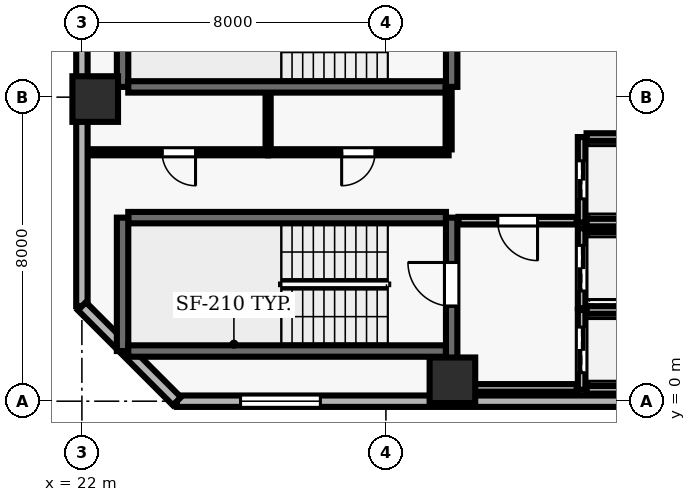
"""IFC4 building model, lengths in metres.
Left out: names, types, materials, properties, quantities, classifications, styles, units other than length and angle.
Written with IfcOpenShell. Run it as: python <this file> out.ifc"""

import sys

from ifc_helpers import new_model, si_unit, direction, frame, frame_2d, origin, origin_2d, place, context, subcontext, project, spatial, rectangle, extrude, element, fill, save


model = new_model("IFC4")
c1 = context("Model", 3, precision=1e-05, world=origin(), true_north=direction((0.0, 1.0)))
c2 = subcontext(c1, "Body", "Model", "MODEL_VIEW")
j1 = project(units=[si_unit("LENGTHUNIT", "METRE"), si_unit("PLANEANGLEUNIT", "RADIAN")], contexts=[c1])
p1 = place(None, origin())
s1 = spatial("IfcSite", under=j1, at=p1, CompositionType="ELEMENT")
p2 = place(p1, origin())
s2 = spatial("IfcBuilding", under=s1, at=p2, CompositionType="ELEMENT")
p3 = place(p2, frame((0.0, 0.0, 161.9)))
s3 = spatial("IfcBuildingStorey", under=s2, at=p3, CompositionType="ELEMENT", Elevation=161.9)
for number, where, z_axis, x_axis in (
    (1, (31.75, 0.55, 0.0), (0.0, 0.0, 1.0), (1.0, 0.0, 0.0)),
    (2, (22.35, 7.95, 0.0), (0.0, 0.0, 1.0), (1.0, 0.0, 0.0)),
):
    element("IfcColumn", number, at=place(p3, frame(where, z_axis=z_axis, x_axis=x_axis)), inside=s3, PredefinedType="COLUMN", context=c2, shape_type="SweptSolid", body=[
        extrude(rectangle(XDim=1.2, YDim=1.2, at=origin_2d()), origin(), (0.0, 0.0, 1.0), 3.9),
    ])
p4 = place(p3, frame((24.5, 0.0, 0.0), z_axis=(0.0, 0.0, 1.0), x_axis=(1.0, 0.0, 0.0)))
e3 = element("IfcWall", 3, at=p4, inside=s3, PredefinedType="SOLIDWALL", context=c2, shape_type="SweptSolid", body=[
    extrude(rectangle(XDim=43.6, YDim=0.3, at=frame_2d((21.8, 0.0))), origin(), (0.0, 0.0, 1.0), 3.64),
])
p5 = place(p4, frame((1.675, 0.0, 0.9)))
e4 = element("IfcOpeningElement", 4, at=p5, cuts=e3, PredefinedType="OPENING", context=c2, shape_type="SweptSolid", body=[
    extrude(rectangle(XDim=2.1, YDim=1.6, at=frame_2d((1.05, 0.8))), frame((0.0, 0.16, 0.0), z_axis=(0.0, -1.0, 0.0), x_axis=(1.0, 0.0, 0.0)), (0.0, 0.0, 1.0), 0.32),
])
p6 = place(p4, frame((18.025, 0.0, 0.9)))
e5 = element("IfcOpeningElement", 5, at=p6, cuts=e3, PredefinedType="OPENING", context=c2, shape_type="SweptSolid", body=[
    extrude(rectangle(XDim=2.1, YDim=1.6, at=frame_2d((1.05, 0.8))), frame((0.0, 0.16, 0.0), z_axis=(0.0, -1.0, 0.0), x_axis=(1.0, 0.0, 0.0)), (0.0, 0.0, 1.0), 0.32),
])
p7 = place(p4, frame((24.375, 0.0, 0.9)))
e6 = element("IfcOpeningElement", 6, at=p7, cuts=e3, PredefinedType="OPENING", context=c2, shape_type="SweptSolid", body=[
    extrude(rectangle(XDim=2.1, YDim=1.6, at=frame_2d((1.05, 0.8))), frame((0.0, 0.16, 0.0), z_axis=(0.0, -1.0, 0.0), x_axis=(1.0, 0.0, 0.0)), (0.0, 0.0, 1.0), 0.32),
])
p8 = place(p4, frame((28.925, 0.0, 0.9)))
e7 = element("IfcOpeningElement", 7, at=p8, cuts=e3, PredefinedType="OPENING", context=c2, shape_type="SweptSolid", body=[
    extrude(rectangle(XDim=2.1, YDim=1.6, at=frame_2d((1.05, 0.8))), frame((0.0, 0.16, 0.0), z_axis=(0.0, -1.0, 0.0), x_axis=(1.0, 0.0, 0.0)), (0.0, 0.0, 1.0), 0.32),
])
p9 = place(p4, frame((34.375, 0.0, 0.9)))
e8 = element("IfcOpeningElement", 8, at=p9, cuts=e3, PredefinedType="OPENING", context=c2, shape_type="SweptSolid", body=[
    extrude(rectangle(XDim=2.1, YDim=1.6, at=frame_2d((1.05, 0.8))), frame((0.0, 0.16, 0.0), z_axis=(0.0, -1.0, 0.0), x_axis=(1.0, 0.0, 0.0)), (0.0, 0.0, 1.0), 0.32),
])
p10 = place(p4, frame((39.825, 0.0, 0.9)))
e9 = element("IfcOpeningElement", 9, at=p10, cuts=e3, PredefinedType="OPENING", context=c2, shape_type="SweptSolid", body=[
    extrude(rectangle(XDim=2.1, YDim=1.6, at=frame_2d((1.05, 0.8))), frame((0.0, 0.16, 0.0), z_axis=(0.0, -1.0, 0.0), x_axis=(1.0, 0.0, 0.0)), (0.0, 0.0, 1.0), 0.32),
])
p11 = place(p3, frame((22.0, 46.1, 0.0), z_axis=(0.0, 0.0, 1.0), x_axis=(0.0, -1.0, 0.0)))
e10 = element("IfcWall", 10, at=p11, inside=s3, PredefinedType="SOLIDWALL", context=c2, shape_type="SweptSolid", body=[
    extrude(rectangle(XDim=43.6, YDim=0.3, at=frame_2d((21.8, 0.0))), origin(), (0.0, 0.0, 1.0), 3.64),
])
p12 = place(p11, frame((7.1, 0.0, 0.0)))
e11 = element("IfcOpeningElement", 11, at=p12, cuts=e10, PredefinedType="OPENING", context=c2, shape_type="SweptSolid", body=[
    extrude(rectangle(XDim=1.0, YDim=2.2, at=frame_2d((0.5, 1.1))), frame((0.0, 0.16, 0.0), z_axis=(0.0, -1.0, 0.0), x_axis=(1.0, 0.0, 0.0)), (0.0, 0.0, 1.0), 0.32),
])
p13 = place(p11, frame((1.675, 0.0, 0.9)))
e12 = element("IfcOpeningElement", 12, at=p13, cuts=e10, PredefinedType="OPENING", context=c2, shape_type="SweptSolid", body=[
    extrude(rectangle(XDim=2.1, YDim=1.6, at=frame_2d((1.05, 0.8))), frame((0.0, 0.16, 0.0), z_axis=(0.0, -1.0, 0.0), x_axis=(1.0, 0.0, 0.0)), (0.0, 0.0, 1.0), 0.32),
])
p14 = place(p11, frame((13.475, 0.0, 0.9)))
e13 = element("IfcOpeningElement", 13, at=p14, cuts=e10, PredefinedType="OPENING", context=c2, shape_type="SweptSolid", body=[
    extrude(rectangle(XDim=2.1, YDim=1.6, at=frame_2d((1.05, 0.8))), frame((0.0, 0.16, 0.0), z_axis=(0.0, -1.0, 0.0), x_axis=(1.0, 0.0, 0.0)), (0.0, 0.0, 1.0), 0.32),
])
p15 = place(p11, frame((17.125, 0.0, 0.9)))
e14 = element("IfcOpeningElement", 14, at=p15, cuts=e10, PredefinedType="OPENING", context=c2, shape_type="SweptSolid", body=[
    extrude(rectangle(XDim=2.1, YDim=1.6, at=frame_2d((1.05, 0.8))), frame((0.0, 0.16, 0.0), z_axis=(0.0, -1.0, 0.0), x_axis=(1.0, 0.0, 0.0)), (0.0, 0.0, 1.0), 0.32),
])
p16 = place(p11, frame((23.475, 0.0, 0.9)))
e15 = element("IfcOpeningElement", 15, at=p16, cuts=e10, PredefinedType="OPENING", context=c2, shape_type="SweptSolid", body=[
    extrude(rectangle(XDim=2.1, YDim=1.6, at=frame_2d((1.05, 0.8))), frame((0.0, 0.16, 0.0), z_axis=(0.0, -1.0, 0.0), x_axis=(1.0, 0.0, 0.0)), (0.0, 0.0, 1.0), 0.32),
])
p17 = place(p11, frame((28.475, 0.0, 0.9)))
e16 = element("IfcOpeningElement", 16, at=p17, cuts=e10, PredefinedType="OPENING", context=c2, shape_type="SweptSolid", body=[
    extrude(rectangle(XDim=2.1, YDim=1.6, at=frame_2d((1.05, 0.8))), frame((0.0, 0.16, 0.0), z_axis=(0.0, -1.0, 0.0), x_axis=(1.0, 0.0, 0.0)), (0.0, 0.0, 1.0), 0.32),
])
p18 = place(p11, frame((34.375, 0.0, 0.9)))
e17 = element("IfcOpeningElement", 17, at=p18, cuts=e10, PredefinedType="OPENING", context=c2, shape_type="SweptSolid", body=[
    extrude(rectangle(XDim=2.1, YDim=1.6, at=frame_2d((1.05, 0.8))), frame((0.0, 0.16, 0.0), z_axis=(0.0, -1.0, 0.0), x_axis=(1.0, 0.0, 0.0)), (0.0, 0.0, 1.0), 0.32),
])
p19 = place(p3, frame((22.0, 2.5, 0.0), z_axis=(0.0, 0.0, 1.0), x_axis=(0.707106781187, -0.707106781187, 0.0)))
e18 = element("IfcWall", 18, at=p19, inside=s3, PredefinedType="SOLIDWALL", context=c2, shape_type="SweptSolid", body=[
    extrude(rectangle(XDim=3.536, YDim=0.3, at=frame_2d((1.768, 0.0))), origin(), (0.0, 0.0, 1.0), 3.64),
])
p20 = place(p3, frame((31.58, 4.83, 0.0), z_axis=(0.0, 0.0, 1.0), x_axis=(-1.0, 0.0, 0.0)))
e19 = element("IfcWall", 19, at=p20, inside=s3, PredefinedType="SHEAR", context=c2, shape_type="SweptSolid", body=[
    extrude(rectangle(XDim=8.36, YDim=0.3, at=frame_2d((4.18, 0.0))), origin(), (0.0, 0.0, 1.0), 3.64),
])
p21 = place(p3, frame((23.07, 4.83, 0.0), z_axis=(0.0, 0.0, 1.0), x_axis=(0.0, -1.0, 0.0)))
e20 = element("IfcWall", 20, at=p21, inside=s3, PredefinedType="SHEAR", context=c2, shape_type="SweptSolid", body=[
    extrude(rectangle(XDim=3.51, YDim=0.3, at=frame_2d((1.755, 0.0))), origin(), (0.0, 0.0, 1.0), 3.64),
])
p22 = place(p3, frame((23.22, 1.32, 0.0), z_axis=(0.0, 0.0, 1.0), x_axis=(1.0, 0.0, 0.0)))
e21 = element("IfcWall", 21, at=p22, inside=s3, PredefinedType="SHEAR", context=c2, shape_type="SweptSolid", body=[
    extrude(rectangle(XDim=8.36, YDim=0.3, at=frame_2d((4.18, 0.0))), origin(), (0.0, 0.0, 1.0), 3.64),
])
p23 = place(p3, frame((31.73, 0.96, 0.0), z_axis=(0.0, 0.0, 1.0), x_axis=(0.0, 1.0, 0.0)))
e22 = element("IfcWall", 22, at=p23, inside=s3, PredefinedType="SHEAR", context=c2, shape_type="SweptSolid", body=[
    extrude(rectangle(XDim=3.87, YDim=0.3, at=frame_2d((1.935, 0.0))), origin(), (0.0, 0.0, 1.0), 3.64),
])
p24 = place(p23, frame((1.54, 0.0, 0.0)))
e23 = element("IfcOpeningElement", 23, at=p24, cuts=e22, PredefinedType="OPENING", context=c2, shape_type="SweptSolid", body=[
    extrude(rectangle(XDim=1.15, YDim=2.15, at=frame_2d((0.575, 1.075))), frame((0.0, 0.16, 0.0), z_axis=(0.0, -1.0, 0.0), x_axis=(1.0, 0.0, 0.0)), (0.0, 0.0, 1.0), 0.32),
])
p25 = place(p3, frame((23.07, 11.78, 0.0), z_axis=(0.0, 0.0, 1.0), x_axis=(0.0, -1.0, 0.0)))
e24 = element("IfcWall", 24, at=p25, inside=s3, PredefinedType="SHEAR", context=c2, shape_type="SweptSolid", body=[
    extrude(rectangle(XDim=3.51, YDim=0.3, at=frame_2d((1.755, 0.0))), origin(), (0.0, 0.0, 1.0), 3.64),
])
p26 = place(p3, frame((23.22, 8.27, 0.0), z_axis=(0.0, 0.0, 1.0), x_axis=(1.0, 0.0, 0.0)))
e25 = element("IfcWall", 25, at=p26, inside=s3, PredefinedType="SHEAR", context=c2, shape_type="SweptSolid", body=[
    extrude(rectangle(XDim=8.36, YDim=0.3, at=frame_2d((4.18, 0.0))), origin(), (0.0, 0.0, 1.0), 3.64),
])
p27 = place(p3, frame((31.73, 8.27, 0.0), z_axis=(0.0, 0.0, 1.0), x_axis=(0.0, 1.0, 0.0)))
e26 = element("IfcWall", 26, at=p27, inside=s3, PredefinedType="SHEAR", context=c2, shape_type="SweptSolid", body=[
    extrude(rectangle(XDim=3.51, YDim=0.3, at=frame_2d((1.755, 0.0))), origin(), (0.0, 0.0, 1.0), 3.64),
])
p28 = place(p27, frame((1.18, 0.0, 0.0)))
e27 = element("IfcOpeningElement", 27, at=p28, cuts=e26, PredefinedType="OPENING", context=c2, shape_type="SweptSolid", body=[
    extrude(rectangle(XDim=1.15, YDim=2.15, at=frame_2d((0.575, 1.075))), frame((0.0, 0.16, 0.0), z_axis=(0.0, -1.0, 0.0), x_axis=(1.0, 0.0, 0.0)), (0.0, 0.0, 1.0), 0.32),
])
p29 = place(p3, frame((35.15, 2.4, 0.0), z_axis=(0.0, 0.0, 1.0), x_axis=(0.0, -1.0, 0.0)))
e28 = element("IfcWall", 28, at=p29, inside=s3, PredefinedType="SOLIDWALL", context=c2, shape_type="SweptSolid", body=[
    extrude(rectangle(XDim=2.1, YDim=0.2, at=frame_2d((1.05, 0.0))), origin(), (0.0, 0.0, 1.0), 3.64),
])
p30 = place(p29, frame((0.45, 0.0, 0.0)))
e29 = element("IfcOpeningElement", 29, at=p30, cuts=e28, PredefinedType="OPENING", context=c2, shape_type="SweptSolid", body=[
    extrude(rectangle(XDim=1.2, YDim=2.15, at=frame_2d((0.6, 1.075))), frame((0.0, 0.11, 0.0), z_axis=(0.0, -1.0, 0.0), x_axis=(1.0, 0.0, 0.0)), (0.0, 0.0, 1.0), 0.22),
])
for number, where, z_axis, x_axis in (
    (30, (35.28, 0.3, 0.0), (0.0, 0.0, 1.0), (1.0, 0.0, 0.0)),
    (31, (37.42, 2.4, 0.0), (0.0, 0.0, 1.0), (-1.0, 0.0, 0.0)),
):
    element("IfcWall", number, at=place(p3, frame(where, z_axis=z_axis, x_axis=x_axis)), inside=s3, PredefinedType="SOLIDWALL", context=c2, shape_type="SweptSolid", body=[
        extrude(rectangle(XDim=2.14, YDim=0.2, at=frame_2d((1.07, 0.0))), origin(), (0.0, 0.0, 1.0), 3.64),
    ])
p31 = place(p3, frame((35.15, 4.55, 0.0), z_axis=(0.0, 0.0, 1.0), x_axis=(0.0, -1.0, 0.0)))
e32 = element("IfcWall", 32, at=p31, inside=s3, PredefinedType="SOLIDWALL", context=c2, shape_type="SweptSolid", body=[
    extrude(rectangle(XDim=2.1, YDim=0.2, at=frame_2d((1.05, 0.0))), origin(), (0.0, 0.0, 1.0), 3.64),
])
p32 = place(p31, frame((0.45, 0.0, 0.0)))
e33 = element("IfcOpeningElement", 33, at=p32, cuts=e32, PredefinedType="OPENING", context=c2, shape_type="SweptSolid", body=[
    extrude(rectangle(XDim=1.2, YDim=2.15, at=frame_2d((0.6, 1.075))), frame((0.0, 0.11, 0.0), z_axis=(0.0, -1.0, 0.0), x_axis=(1.0, 0.0, 0.0)), (0.0, 0.0, 1.0), 0.22),
])
p33 = place(p3, frame((37.42, 4.55, 0.0), z_axis=(0.0, 0.0, 1.0), x_axis=(-1.0, 0.0, 0.0)))
e34 = element("IfcWall", 34, at=p33, inside=s3, PredefinedType="SOLIDWALL", context=c2, shape_type="SweptSolid", body=[
    extrude(rectangle(XDim=2.14, YDim=0.2, at=frame_2d((1.07, 0.0))), origin(), (0.0, 0.0, 1.0), 3.64),
])
p34 = place(p3, frame((35.15, 6.95, 0.0), z_axis=(0.0, 0.0, 1.0), x_axis=(0.0, -1.0, 0.0)))
e35 = element("IfcWall", 35, at=p34, inside=s3, PredefinedType="SOLIDWALL", context=c2, shape_type="SweptSolid", body=[
    extrude(rectangle(XDim=2.25, YDim=0.2, at=frame_2d((1.125, 0.0))), origin(), (0.0, 0.0, 1.0), 3.64),
])
p35 = place(p34, frame((0.625, 0.0, 0.0)))
e36 = element("IfcOpeningElement", 36, at=p35, cuts=e35, PredefinedType="OPENING", context=c2, shape_type="SweptSolid", body=[
    extrude(rectangle(XDim=1.0, YDim=2.1, at=frame_2d((0.5, 1.05))), frame((0.0, 0.11, 0.0), z_axis=(0.0, -1.0, 0.0), x_axis=(1.0, 0.0, 0.0)), (0.0, 0.0, 1.0), 0.22),
])
for number, where, z_axis, x_axis in (
    (37, (35.28, 4.7, 0.0), (0.0, 0.0, 1.0), (1.0, 0.0, 0.0)),
    (38, (37.42, 6.95, 0.0), (0.0, 0.0, 1.0), (-1.0, 0.0, 0.0)),
):
    element("IfcWall", number, at=place(p3, frame(where, z_axis=z_axis, x_axis=x_axis)), inside=s3, PredefinedType="SOLIDWALL", context=c2, shape_type="SweptSolid", body=[
        extrude(rectangle(XDim=2.14, YDim=0.2, at=frame_2d((1.07, 0.0))), origin(), (0.0, 0.0, 1.0), 3.64),
    ])
p36 = place(p3, frame((26.9, 6.55, 0.0), z_axis=(0.0, 0.0, 1.0), x_axis=(-1.0, 0.0, 0.0)))
e39 = element("IfcWall", 39, at=p36, inside=s3, PredefinedType="PARTITIONING", context=c2, shape_type="SweptSolid", body=[
    extrude(rectangle(XDim=4.7, YDim=0.16, at=frame_2d((2.35, 0.0))), origin(), (0.0, 0.0, 1.0), 3.64),
])
p37 = place(p36, frame((1.91, 0.0, 0.0)))
e40 = element("IfcOpeningElement", 40, at=p37, cuts=e39, PredefinedType="OPENING", context=c2, shape_type="SweptSolid", body=[
    extrude(rectangle(XDim=0.88, YDim=2.1, at=frame_2d((0.44, 1.05))), frame((0.0, 0.09, 0.0), z_axis=(0.0, -1.0, 0.0), x_axis=(1.0, 0.0, 0.0)), (0.0, 0.0, 1.0), 0.18),
])
p38 = place(p3, frame((31.65, 0.35, 0.0), z_axis=(0.0, 0.0, 1.0), x_axis=(1.0, 0.0, 0.0)))
e41 = element("IfcWall", 41, at=p38, inside=s3, PredefinedType="SOLIDWALL", context=c2, shape_type="SweptSolid", body=[
    extrude(rectangle(XDim=3.37, YDim=0.2, at=frame_2d((1.685, 0.0))), origin(), (0.0, 0.0, 1.0), 3.64),
])
p39 = place(p3, frame((31.65, 6.55, 0.0), z_axis=(0.0, 0.0, 1.0), x_axis=(-1.0, 0.0, 0.0)))
e42 = element("IfcWall", 42, at=p39, inside=s3, PredefinedType="PARTITIONING", context=c2, shape_type="SweptSolid", body=[
    extrude(rectangle(XDim=4.75, YDim=0.16, at=frame_2d((2.375, 0.0))), origin(), (0.0, 0.0, 1.0), 3.64),
])
p40 = place(p39, frame((1.935, 0.0, 0.0)))
e43 = element("IfcOpeningElement", 43, at=p40, cuts=e42, PredefinedType="OPENING", context=c2, shape_type="SweptSolid", body=[
    extrude(rectangle(XDim=0.88, YDim=2.1, at=frame_2d((0.44, 1.05))), frame((0.0, 0.09, 0.0), z_axis=(0.0, -1.0, 0.0), x_axis=(1.0, 0.0, 0.0)), (0.0, 0.0, 1.0), 0.18),
])
p41 = place(p3, frame((35.02, 4.75, 0.0), z_axis=(0.0, 0.0, 1.0), x_axis=(-1.0, 0.0, 0.0)))
e44 = element("IfcWall", 44, at=p41, inside=s3, PredefinedType="SOLIDWALL", context=c2, shape_type="SweptSolid", body=[
    extrude(rectangle(XDim=3.11, YDim=0.2, at=frame_2d((1.555, 0.0))), origin(), (0.0, 0.0, 1.0), 3.64),
])
p42 = place(p41, frame((1.03, 0.0, 0.0)))
e45 = element("IfcOpeningElement", 45, at=p42, cuts=e44, PredefinedType="OPENING", context=c2, shape_type="SweptSolid", body=[
    extrude(rectangle(XDim=1.05, YDim=2.15, at=frame_2d((0.525, 1.075))), frame((0.0, 0.11, 0.0), z_axis=(0.0, -1.0, 0.0), x_axis=(1.0, 0.0, 0.0)), (0.0, 0.0, 1.0), 0.22),
])
p43 = place(p3, frame((26.9, 6.625, 0.0), z_axis=(0.0, 0.0, 1.0), x_axis=(0.0, 1.0, 0.0)))
e46 = element("IfcWall", 46, at=p43, inside=s3, PredefinedType="PARTITIONING", context=c2, shape_type="SweptSolid", body=[
    extrude(rectangle(XDim=1.465, YDim=0.135, at=frame_2d((0.732, 0.0))), origin(), (0.0, 0.0, 1.0), 3.64),
])
p44 = place(p3, frame((31.65, 8.24, 0.0), z_axis=(0.0, 0.0, 1.0), x_axis=(0.0, -1.0, 0.0)))
e47 = element("IfcWall", 47, at=p44, inside=s3, PredefinedType="PARTITIONING", context=c2, shape_type="SweptSolid", body=[
    extrude(rectangle(XDim=1.615, YDim=0.16, at=frame_2d((0.808, 0.0))), origin(), (0.0, 0.0, 1.0), 3.64),
])
p45 = place(p5, origin())
e48 = element("IfcWindow", 48, at=p45, inside=s3, PartitioningType="SINGLE_PANEL", PredefinedType="WINDOW", context=c2, shape_type="SweptSolid", body=[
    extrude(rectangle(XDim=2.1, YDim=1.6, at=frame_2d((1.05, 0.8))), frame((0.0, 0.03, 0.0), z_axis=(0.0, -1.0, 0.0), x_axis=(1.0, 0.0, 0.0)), (0.0, 0.0, 1.0), 0.06),
])
fill(e4, e48)
p46 = place(p24, origin())
e49 = element("IfcDoor", 49, at=p46, inside=s3, OperationType="SINGLE_SWING_RIGHT", PredefinedType="DOOR", context=c2, shape_type="SweptSolid", body=[
    extrude(rectangle(XDim=1.15, YDim=2.15, at=frame_2d((0.575, 1.075))), frame((0.0, 0.025, 0.0), z_axis=(0.0, -1.0, 0.0), x_axis=(1.0, 0.0, 0.0)), (0.0, 0.0, 1.0), 0.05),
])
fill(e23, e49)
p47 = place(p30, origin())
e50 = element("IfcDoor", 50, at=p47, inside=s3, OperationType="DOUBLE_DOOR_SLIDING", PredefinedType="DOOR", context=c2, shape_type="SweptSolid", body=[
    extrude(rectangle(XDim=1.2, YDim=2.15, at=frame_2d((0.6, 1.075))), frame((0.0, 0.025, 0.0), z_axis=(0.0, -1.0, 0.0), x_axis=(1.0, 0.0, 0.0)), (0.0, 0.0, 1.0), 0.05),
])
fill(e29, e50)
p48 = place(p32, origin())
e51 = element("IfcDoor", 51, at=p48, inside=s3, OperationType="DOUBLE_DOOR_SLIDING", PredefinedType="DOOR", context=c2, shape_type="SweptSolid", body=[
    extrude(rectangle(XDim=1.2, YDim=2.15, at=frame_2d((0.6, 1.075))), frame((0.0, 0.025, 0.0), z_axis=(0.0, -1.0, 0.0), x_axis=(1.0, 0.0, 0.0)), (0.0, 0.0, 1.0), 0.05),
])
fill(e33, e51)
p49 = place(p35, origin())
e52 = element("IfcDoor", 52, at=p49, inside=s3, OperationType="DOUBLE_DOOR_SLIDING", PredefinedType="DOOR", context=c2, shape_type="SweptSolid", body=[
    extrude(rectangle(XDim=1.0, YDim=2.1, at=frame_2d((0.5, 1.05))), frame((0.0, 0.025, 0.0), z_axis=(0.0, -1.0, 0.0), x_axis=(1.0, 0.0, 0.0)), (0.0, 0.0, 1.0), 0.05),
])
fill(e36, e52)
p50 = place(p42, origin())
e53 = element("IfcDoor", 53, at=p50, inside=s3, OperationType="SINGLE_SWING_LEFT", PredefinedType="DOOR", context=c2, shape_type="SweptSolid", body=[
    extrude(rectangle(XDim=1.05, YDim=2.15, at=frame_2d((0.525, 1.075))), frame((0.0, 0.025, 0.0), z_axis=(0.0, -1.0, 0.0), x_axis=(1.0, 0.0, 0.0)), (0.0, 0.0, 1.0), 0.05),
])
fill(e45, e53)
p51 = place(p37, origin())
e54 = element("IfcDoor", 54, at=p51, inside=s3, OperationType="SINGLE_SWING_LEFT", PredefinedType="DOOR", context=c2, shape_type="SweptSolid", body=[
    extrude(rectangle(XDim=0.88, YDim=2.1, at=frame_2d((0.44, 1.05))), frame((0.0, 0.025, 0.0), z_axis=(0.0, -1.0, 0.0), x_axis=(1.0, 0.0, 0.0)), (0.0, 0.0, 1.0), 0.05),
])
fill(e40, e54)
p52 = place(p40, origin())
e55 = element("IfcDoor", 55, at=p52, inside=s3, OperationType="SINGLE_SWING_RIGHT", PredefinedType="DOOR", context=c2, shape_type="SweptSolid", body=[
    extrude(rectangle(XDim=0.88, YDim=2.1, at=frame_2d((0.44, 1.05))), frame((0.0, 0.025, 0.0), z_axis=(0.0, -1.0, 0.0), x_axis=(1.0, 0.0, 0.0)), (0.0, 0.0, 1.0), 0.05),
])
fill(e43, e55)
save(model, sys.argv[1])
